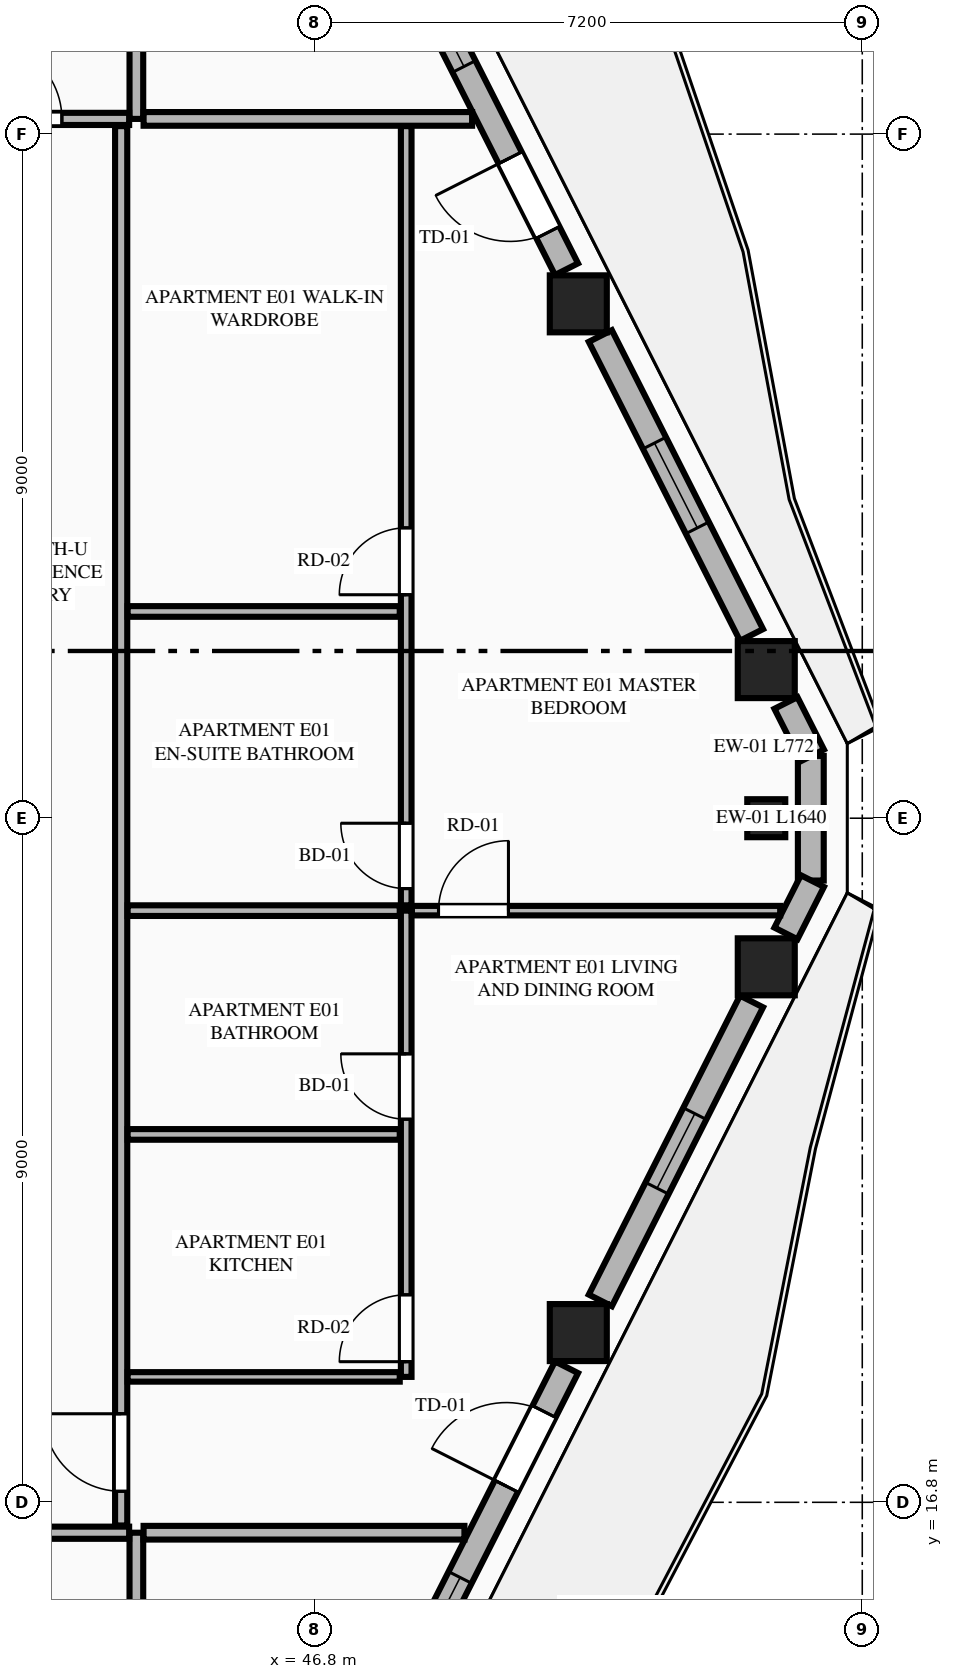
"""IFC4 building model, lengths in metres.
Left out: names, types, materials, properties, quantities, classifications, styles, units other than length and angle.
Written with IfcOpenShell. Run it as: python <this file> out.ifc"""

import sys

from ifc_helpers import new_model, si_unit, direction, frame, frame_2d, origin, origin_2d, place, context, subcontext, project, spatial, rectangle, extrude, element, fill, save


model = new_model("IFC4")
c1 = context("Model", 3, precision=1e-05, world=origin(), true_north=direction((0.0, 1.0)))
c2 = subcontext(c1, "Body", "Model", "MODEL_VIEW")
j1 = project(units=[si_unit("LENGTHUNIT", "METRE"), si_unit("PLANEANGLEUNIT", "RADIAN")], contexts=[c1])
p1 = place(None, origin())
s1 = spatial("IfcSite", under=j1, at=p1, CompositionType="ELEMENT")
p2 = place(p1, origin())
s2 = spatial("IfcBuilding", under=s1, at=p2, CompositionType="ELEMENT")
p3 = place(p2, frame((0.0, 0.0, 237.95)))
s3 = spatial("IfcBuildingStorey", under=s2, at=p3, CompositionType="ELEMENT", Elevation=237.95)
for number, where, z_axis, x_axis in (
    (1, (50.264, 19.033, 0.0), (0.0, 0.0, 1.0), (1.0, 0.0, 0.0)),
    (2, (52.737, 23.845, 0.0), (0.0, 0.0, 1.0), (1.0, 0.0, 0.0)),
    (3, (52.737, 27.755, 0.0), (0.0, 0.0, 1.0), (1.0, 0.0, 0.0)),
    (4, (50.264, 32.567, 0.0), (0.0, 0.0, 1.0), (1.0, 0.0, 0.0)),
):
    element("IfcColumn", number, at=place(p3, frame(where, z_axis=z_axis, x_axis=x_axis)), inside=s3, PredefinedType="COLUMN", context=c2, shape_type="SweptSolid", body=[
        extrude(rectangle(XDim=0.75, YDim=0.75, at=origin_2d()), origin(), (0.0, 0.0, 1.0), 3.65),
    ])
p4 = place(p3, frame((52.737, 25.8, 0.0), z_axis=(0.0, 0.0, 1.0), x_axis=(0.0, 1.0, 0.0)))
e5 = element("IfcColumn", 5, at=p4, inside=s3, PredefinedType="PILASTER", context=c2, shape_type="SweptSolid", body=[
    extrude(rectangle(XDim=0.5, YDim=0.35, at=origin_2d()), origin(), (0.0, 0.0, 1.0), 3.65),
])
p5 = place(p3, frame((53.323, 24.98, 0.0), z_axis=(0.0, 0.0, 1.0), x_axis=(0.0, 1.0, 0.0)))
e6 = element("IfcWall", 6, at=p5, inside=s3, PredefinedType="STANDARD", context=c2, shape_type="SweptSolid", body=[
    extrude(rectangle(XDim=1.64, YDim=0.34, at=frame_2d((0.82, 0.0))), origin(), (0.0, 0.0, 1.0), 3.45),
])
p6 = place(p3, frame((48.032, 14.473, 0.0), z_axis=(0.0, 0.0, 1.0), x_axis=(0.451539564999, 0.892251097641, 0.0)))
e7 = element("IfcWall", 7, at=p6, inside=s3, PredefinedType="STANDARD", context=c2, shape_type="SweptSolid", body=[
    extrude(rectangle(XDim=4.6, YDim=0.34, at=frame_2d((2.3, 0.0))), origin(), (0.0, 0.0, 1.0), 2.983),
])
p7 = place(p6, frame((2.846, 0.0, 0.0)))
e8 = element("IfcOpeningElement", 8, at=p7, cuts=e7, PredefinedType="OPENING", context=c2, shape_type="SweptSolid", body=[
    extrude(rectangle(XDim=1.1, YDim=2.25, at=frame_2d((0.55, 1.125))), frame((0.0, 0.18, 0.0), z_axis=(0.0, -1.0, 0.0), x_axis=(1.0, 0.0, 0.0)), (0.0, 0.0, 1.0), 0.36),
])
p8 = place(p6, frame((0.4, 0.0, 0.75)))
e9 = element("IfcOpeningElement", 9, at=p8, cuts=e7, PredefinedType="OPENING", context=c2, shape_type="SweptSolid", body=[
    extrude(rectangle(XDim=1.1, YDim=2.0, at=frame_2d((0.55, 1.0))), frame((0.0, 0.18, 0.0), z_axis=(0.0, -1.0, 0.0), x_axis=(1.0, 0.0, 0.0)), (0.0, 0.0, 1.0), 0.36),
])
p9 = place(p3, frame((50.554, 19.456, 0.0), z_axis=(0.0, 0.0, 1.0), x_axis=(0.45130817501, 0.892368158984, 0.0)))
e10 = element("IfcWall", 10, at=p9, inside=s3, PredefinedType="STANDARD", context=c2, shape_type="SweptSolid", body=[
    extrude(rectangle(XDim=4.407, YDim=0.34, at=frame_2d((2.204, 0.0))), origin(), (0.0, 0.0, 1.0), 2.983),
])
p10 = place(p9, frame((1.654, 0.0, 0.75)))
e11 = element("IfcOpeningElement", 11, at=p10, cuts=e10, PredefinedType="OPENING", context=c2, shape_type="SweptSolid", body=[
    extrude(rectangle(XDim=1.1, YDim=2.0, at=frame_2d((0.55, 1.0))), frame((0.0, 0.18, 0.0), z_axis=(0.0, -1.0, 0.0), x_axis=(1.0, 0.0, 0.0)), (0.0, 0.0, 1.0), 0.36),
])
for number, where, z_axis, x_axis in (
    (12, (52.996, 24.284, 0.0), (0.0, 0.0, 1.0), (0.451, 0.893, 0.0)),
    (13, (53.344, 26.627, 0.0), (0.0, 0.0, 1.0), (-0.451, 0.893, 0.0)),
):
    element("IfcWall", number, at=place(p3, frame(where, z_axis=z_axis, x_axis=x_axis)), inside=s3, PredefinedType="STANDARD", context=c2, shape_type="SweptSolid", body=[
        extrude(rectangle(XDim=0.772, YDim=0.34, at=frame_2d((0.386, 0.0))), origin(), (0.0, 0.0, 1.0), 3.45),
    ])
p11 = place(p3, frame((52.543, 28.211, 0.0), z_axis=(0.0, 0.0, 1.0), x_axis=(-0.451285866323, 0.892379441077, 0.0)))
e14 = element("IfcWall", 14, at=p11, inside=s3, PredefinedType="STANDARD", context=c2, shape_type="SweptSolid", body=[
    extrude(rectangle(XDim=4.407, YDim=0.34, at=frame_2d((2.204, 0.0))), origin(), (0.0, 0.0, 1.0), 2.983),
])
p12 = place(p11, frame((1.579, 0.0, 0.75)))
e15 = element("IfcOpeningElement", 15, at=p12, cuts=e14, PredefinedType="OPENING", context=c2, shape_type="SweptSolid", body=[
    extrude(rectangle(XDim=1.25, YDim=1.95, at=frame_2d((0.625, 0.975))), frame((0.0, 0.18, 0.0), z_axis=(0.0, -1.0, 0.0), x_axis=(1.0, 0.0, 0.0)), (0.0, 0.0, 1.0), 0.36),
])
p13 = place(p3, frame((50.109, 33.023, 0.0), z_axis=(0.0, 0.0, 1.0), x_axis=(-0.451539564999, 0.892251097641, 0.0)))
e16 = element("IfcWall", 16, at=p13, inside=s3, PredefinedType="STANDARD", context=c2, shape_type="SweptSolid", body=[
    extrude(rectangle(XDim=4.6, YDim=0.34, at=frame_2d((2.3, 0.0))), origin(), (0.0, 0.0, 1.0), 2.983),
])
p14 = place(p13, frame((0.542, 0.0, 0.0)))
e17 = element("IfcOpeningElement", 17, at=p14, cuts=e16, PredefinedType="OPENING", context=c2, shape_type="SweptSolid", body=[
    extrude(rectangle(XDim=1.1, YDim=2.25, at=frame_2d((0.55, 1.125))), frame((0.0, 0.18, 0.0), z_axis=(0.0, -1.0, 0.0), x_axis=(1.0, 0.0, 0.0)), (0.0, 0.0, 1.0), 0.36),
])
p15 = place(p13, frame((2.988, 0.0, 0.75)))
e18 = element("IfcOpeningElement", 18, at=p15, cuts=e16, PredefinedType="OPENING", context=c2, shape_type="SweptSolid", body=[
    extrude(rectangle(XDim=1.1, YDim=2.0, at=frame_2d((0.55, 1.0))), frame((0.0, 0.18, 0.0), z_axis=(0.0, -1.0, 0.0), x_axis=(1.0, 0.0, 0.0)), (0.0, 0.0, 1.0), 0.36),
])
p16 = place(p3, frame((44.45, 8.119, 0.0), z_axis=(0.0, 0.0, 1.0), x_axis=(0.0, 1.0, 0.0)))
e19 = element("IfcWall", 19, at=p16, inside=s3, PredefinedType="PARTITIONING", context=c2, shape_type="SweptSolid", body=[
    extrude(rectangle(XDim=8.281, YDim=0.18, at=frame_2d((4.141, 0.0))), origin(), (0.0, 0.0, 1.0), 3.45),
])
p17 = place(p3, frame((29.241, 16.4, 0.0), z_axis=(0.0, 0.0, 1.0), x_axis=(1.0, 0.0, 0.0)))
e20 = element("IfcWall", 20, at=p17, inside=s3, PredefinedType="PARTITIONING", context=c2, shape_type="SweptSolid", body=[
    extrude(rectangle(XDim=15.114, YDim=0.16, at=frame_2d((7.557, 0.0))), origin(), (0.0, 0.0, 1.0), 3.45),
])
p18 = place(p17, frame((12.909, 0.0, 0.0)))
e21 = element("IfcOpeningElement", 21, at=p18, cuts=e20, PredefinedType="OPENING", context=c2, shape_type="SweptSolid", body=[
    extrude(rectangle(XDim=1.02, YDim=2.25, at=frame_2d((0.51, 1.125))), frame((0.0, 0.09, 0.0), z_axis=(0.0, -1.0, 0.0), x_axis=(1.0, 0.0, 0.0)), (0.0, 0.0, 1.0), 0.18),
])
p19 = place(p3, frame((44.45, 35.0, 0.0), z_axis=(0.0, 0.0, 1.0), x_axis=(0.0, 1.0, 0.0)))
e22 = element("IfcWall", 22, at=p19, inside=s3, PredefinedType="PARTITIONING", context=c2, shape_type="SweptSolid", body=[
    extrude(rectangle(XDim=8.481, YDim=0.18, at=frame_2d((4.24, 0.0))), origin(), (0.0, 0.0, 1.0), 3.45),
])
p20 = place(p3, frame((29.241, 35.0, 0.0), z_axis=(0.0, 0.0, 1.0), x_axis=(1.0, 0.0, 0.0)))
e23 = element("IfcWall", 23, at=p20, inside=s3, PredefinedType="PARTITIONING", context=c2, shape_type="SweptSolid", body=[
    extrude(rectangle(XDim=15.114, YDim=0.16, at=frame_2d((7.557, 0.0))), origin(), (0.0, 0.0, 1.0), 3.45),
])
p21 = place(p20, frame((13.209, 0.0, 0.0)))
e24 = element("IfcOpeningElement", 24, at=p21, cuts=e23, PredefinedType="OPENING", context=c2, shape_type="SweptSolid", body=[
    extrude(rectangle(XDim=1.02, YDim=2.25, at=frame_2d((0.51, 1.125))), frame((0.0, 0.09, 0.0), z_axis=(0.0, -1.0, 0.0), x_axis=(1.0, 0.0, 0.0)), (0.0, 0.0, 1.0), 0.18),
])
p22 = place(p3, frame((44.545, 16.4, 0.0), z_axis=(0.0, 0.0, 1.0), x_axis=(1.0, 0.0, 0.0)))
e25 = element("IfcWall", 25, at=p22, inside=s3, PredefinedType="PARTITIONING", context=c2, shape_type="SweptSolid", body=[
    extrude(rectangle(XDim=4.221, YDim=0.18, at=frame_2d((2.111, 0.0))), origin(), (0.0, 0.0, 1.0), 3.45),
])
p23 = place(p3, frame((44.545, 35.0, 0.0), z_axis=(0.0, 0.0, 1.0), x_axis=(1.0, 0.0, 0.0)))
e26 = element("IfcWall", 26, at=p23, inside=s3, PredefinedType="PARTITIONING", context=c2, shape_type="SweptSolid", body=[
    extrude(rectangle(XDim=4.322, YDim=0.18, at=frame_2d((2.161, 0.0))), origin(), (0.0, 0.0, 1.0), 3.45),
])
p24 = place(p3, frame((44.25, 16.495, 0.0), z_axis=(0.0, 0.0, 1.0), x_axis=(0.0, 1.0, 0.0)))
e27 = element("IfcWall", 27, at=p24, inside=s3, PredefinedType="PARTITIONING", context=c2, shape_type="SweptSolid", body=[
    extrude(rectangle(XDim=18.41, YDim=0.16, at=frame_2d((9.205, 0.0))), origin(), (0.0, 0.0, 1.0), 3.137),
])
p25 = place(p24, frame((0.45, 0.0, 0.0)))
e28 = element("IfcOpeningElement", 28, at=p25, cuts=e27, PredefinedType="OPENING", context=c2, shape_type="SweptSolid", body=[
    extrude(rectangle(XDim=1.02, YDim=2.25, at=frame_2d((0.51, 1.125))), frame((0.0, 0.09, 0.0), z_axis=(0.0, -1.0, 0.0), x_axis=(1.0, 0.0, 0.0)), (0.0, 0.0, 1.0), 0.18),
])
p26 = place(p3, frame((44.335, 18.45, 0.0), z_axis=(0.0, 0.0, 1.0), x_axis=(1.0, 0.0, 0.0)))
e29 = element("IfcWall", 29, at=p26, inside=s3, PredefinedType="PARTITIONING", context=c2, shape_type="SweptSolid", body=[
    extrude(rectangle(XDim=3.58, YDim=0.125, at=frame_2d((1.79, 0.0))), origin(), (0.0, 0.0, 1.0), 3.45),
])
p27 = place(p3, frame((48.0, 18.45, 0.0), z_axis=(0.0, 0.0, 1.0), x_axis=(0.0, 1.0, 0.0)))
e30 = element("IfcWall", 30, at=p27, inside=s3, PredefinedType="PLUMBINGWALL", context=c2, shape_type="SweptSolid", body=[
    extrude(rectangle(XDim=6.134, YDim=0.14, at=frame_2d((3.067, 0.0))), origin(), (0.0, 0.0, 1.0), 3.45),
])
p28 = place(p27, frame((0.2, 0.0, 0.0)))
e31 = element("IfcOpeningElement", 31, at=p28, cuts=e30, PredefinedType="OPENING", context=c2, shape_type="SweptSolid", body=[
    extrude(rectangle(XDim=0.88, YDim=2.15, at=frame_2d((0.44, 1.075))), frame((0.0, 0.08, 0.0), z_axis=(0.0, -1.0, 0.0), x_axis=(1.0, 0.0, 0.0)), (0.0, 0.0, 1.0), 0.16),
])
p29 = place(p27, frame((3.39, 0.0, 0.0)))
e32 = element("IfcOpeningElement", 32, at=p29, cuts=e30, PredefinedType="OPENING", context=c2, shape_type="SweptSolid", body=[
    extrude(rectangle(XDim=0.86, YDim=2.1, at=frame_2d((0.43, 1.05))), frame((0.0, 0.08, 0.0), z_axis=(0.0, -1.0, 0.0), x_axis=(1.0, 0.0, 0.0)), (0.0, 0.0, 1.0), 0.16),
])
p30 = place(p3, frame((48.0, 24.654, 0.0), z_axis=(0.0, 0.0, 1.0), x_axis=(0.0, 1.0, 0.0)))
e33 = element("IfcWall", 33, at=p30, inside=s3, PredefinedType="PLUMBINGWALL", context=c2, shape_type="SweptSolid", body=[
    extrude(rectangle(XDim=10.251, YDim=0.14, at=frame_2d((5.125, 0.0))), origin(), (0.0, 0.0, 1.0), 3.45),
])
p31 = place(p30, frame((0.22, 0.0, 0.0)))
e34 = element("IfcOpeningElement", 34, at=p31, cuts=e33, PredefinedType="OPENING", context=c2, shape_type="SweptSolid", body=[
    extrude(rectangle(XDim=0.86, YDim=2.1, at=frame_2d((0.43, 1.05))), frame((0.0, 0.08, 0.0), z_axis=(0.0, -1.0, 0.0), x_axis=(1.0, 0.0, 0.0)), (0.0, 0.0, 1.0), 0.16),
])
p32 = place(p30, frame((4.086, 0.0, 0.0)))
e35 = element("IfcOpeningElement", 35, at=p32, cuts=e33, PredefinedType="OPENING", context=c2, shape_type="SweptSolid", body=[
    extrude(rectangle(XDim=0.88, YDim=2.15, at=frame_2d((0.44, 1.075))), frame((0.0, 0.08, 0.0), z_axis=(0.0, -1.0, 0.0), x_axis=(1.0, 0.0, 0.0)), (0.0, 0.0, 1.0), 0.16),
])
p33 = place(p3, frame((44.335, 24.584, 0.0), z_axis=(0.0, 0.0, 1.0), x_axis=(1.0, 0.0, 0.0)))
e36 = element("IfcWall", 36, at=p33, inside=s3, PredefinedType="PLUMBINGWALL", context=c2, shape_type="SweptSolid", body=[
    extrude(rectangle(XDim=3.58, YDim=0.14, at=frame_2d((1.79, 0.0))), origin(), (0.0, 0.0, 1.0), 3.45),
])
p34 = place(p3, frame((48.075, 24.584, 0.0), z_axis=(0.0, 0.0, 1.0), x_axis=(1.0, 0.0, 0.0)))
e37 = element("IfcWall", 37, at=p34, inside=s3, PredefinedType="PARTITIONING", context=c2, shape_type="SweptSolid", body=[
    extrude(rectangle(XDim=4.845, YDim=0.125, at=frame_2d((2.422, 0.0))), origin(), (0.0, 0.0, 1.0), 3.45),
])
p35 = place(p34, frame((0.35, 0.0, 0.0)))
e38 = element("IfcOpeningElement", 38, at=p35, cuts=e37, PredefinedType="OPENING", context=c2, shape_type="SweptSolid", body=[
    extrude(rectangle(XDim=0.92, YDim=2.15, at=frame_2d((0.46, 1.075))), frame((0.0, 0.073, 0.0), z_axis=(0.0, -1.0, 0.0), x_axis=(1.0, 0.0, 0.0)), (0.0, 0.0, 1.0), 0.145),
])
for number, where, z_axis, x_axis in (
    (39, (44.335, 21.64, 0.0), (0.0, 0.0, 1.0), (1.0, 0.0, 0.0)),
    (40, (44.335, 28.52, 0.0), (0.0, 0.0, 1.0), (1.0, 0.0, 0.0)),
):
    element("IfcWall", number, at=place(p3, frame(where, z_axis=z_axis, x_axis=x_axis)), inside=s3, PredefinedType="PLUMBINGWALL", context=c2, shape_type="SweptSolid", body=[
        extrude(rectangle(XDim=3.58, YDim=0.14, at=frame_2d((1.79, 0.0))), origin(), (0.0, 0.0, 1.0), 3.45),
    ])
p36 = place(p7, origin())
e41 = element("IfcDoor", 41, at=p36, inside=s3, OperationType="SINGLE_SWING_LEFT", PredefinedType="DOOR", context=c2, shape_type="SweptSolid", body=[
    extrude(rectangle(XDim=1.1, YDim=2.25, at=frame_2d((0.55, 1.125))), frame((0.0, 0.025, 0.0), z_axis=(0.0, -1.0, 0.0), x_axis=(1.0, 0.0, 0.0)), (0.0, 0.0, 1.0), 0.05),
])
fill(e8, e41)
p37 = place(p10, origin())
e42 = element("IfcWindow", 42, at=p37, inside=s3, PartitioningType="SINGLE_PANEL", PredefinedType="WINDOW", context=c2, shape_type="SweptSolid", body=[
    extrude(rectangle(XDim=1.1, YDim=2.0, at=frame_2d((0.55, 1.0))), frame((0.0, 0.03, 0.0), z_axis=(0.0, -1.0, 0.0), x_axis=(1.0, 0.0, 0.0)), (0.0, 0.0, 1.0), 0.06),
])
fill(e11, e42)
p38 = place(p12, origin())
e43 = element("IfcWindow", 43, at=p38, inside=s3, PartitioningType="SINGLE_PANEL", PredefinedType="WINDOW", context=c2, shape_type="SweptSolid", body=[
    extrude(rectangle(XDim=1.25, YDim=1.95, at=frame_2d((0.625, 0.975))), frame((0.0, 0.03, 0.0), z_axis=(0.0, -1.0, 0.0), x_axis=(1.0, 0.0, 0.0)), (0.0, 0.0, 1.0), 0.06),
])
fill(e15, e43)
p39 = place(p14, origin())
e44 = element("IfcDoor", 44, at=p39, inside=s3, OperationType="SINGLE_SWING_RIGHT", PredefinedType="DOOR", context=c2, shape_type="SweptSolid", body=[
    extrude(rectangle(XDim=1.1, YDim=2.25, at=frame_2d((0.55, 1.125))), frame((0.0, 0.025, 0.0), z_axis=(0.0, -1.0, 0.0), x_axis=(1.0, 0.0, 0.0)), (0.0, 0.0, 1.0), 0.05),
])
fill(e17, e44)
p40 = place(p21, origin())
e45 = element("IfcDoor", 45, at=p40, inside=s3, OperationType="SINGLE_SWING_LEFT", PredefinedType="DOOR", context=c2, shape_type="SweptSolid", body=[
    extrude(rectangle(XDim=1.02, YDim=2.25, at=frame_2d((0.51, 1.125))), frame((0.0, 0.025, 0.0), z_axis=(0.0, -1.0, 0.0), x_axis=(1.0, 0.0, 0.0)), (0.0, 0.0, 1.0), 0.05),
])
fill(e24, e45)
p41 = place(p28, origin())
e46 = element("IfcDoor", 46, at=p41, inside=s3, OperationType="SINGLE_SWING_LEFT", PredefinedType="DOOR", context=c2, shape_type="SweptSolid", body=[
    extrude(rectangle(XDim=0.88, YDim=2.15, at=frame_2d((0.44, 1.075))), frame((0.0, 0.025, 0.0), z_axis=(0.0, -1.0, 0.0), x_axis=(1.0, 0.0, 0.0)), (0.0, 0.0, 1.0), 0.05),
])
fill(e31, e46)
p42 = place(p29, origin())
e47 = element("IfcDoor", 47, at=p42, inside=s3, OperationType="SINGLE_SWING_RIGHT", PredefinedType="DOOR", context=c2, shape_type="SweptSolid", body=[
    extrude(rectangle(XDim=0.86, YDim=2.1, at=frame_2d((0.43, 1.05))), frame((0.0, 0.025, 0.0), z_axis=(0.0, -1.0, 0.0), x_axis=(1.0, 0.0, 0.0)), (0.0, 0.0, 1.0), 0.05),
])
fill(e32, e47)
p43 = place(p31, origin())
e48 = element("IfcDoor", 48, at=p43, inside=s3, OperationType="SINGLE_SWING_RIGHT", PredefinedType="DOOR", context=c2, shape_type="SweptSolid", body=[
    extrude(rectangle(XDim=0.86, YDim=2.1, at=frame_2d((0.43, 1.05))), frame((0.0, 0.025, 0.0), z_axis=(0.0, -1.0, 0.0), x_axis=(1.0, 0.0, 0.0)), (0.0, 0.0, 1.0), 0.05),
])
fill(e34, e48)
p44 = place(p32, origin())
e49 = element("IfcDoor", 49, at=p44, inside=s3, OperationType="SINGLE_SWING_LEFT", PredefinedType="DOOR", context=c2, shape_type="SweptSolid", body=[
    extrude(rectangle(XDim=0.88, YDim=2.15, at=frame_2d((0.44, 1.075))), frame((0.0, 0.025, 0.0), z_axis=(0.0, -1.0, 0.0), x_axis=(1.0, 0.0, 0.0)), (0.0, 0.0, 1.0), 0.05),
])
fill(e35, e49)
p45 = place(p25, origin())
e50 = element("IfcDoor", 50, at=p45, inside=s3, OperationType="SINGLE_SWING_RIGHT", PredefinedType="DOOR", context=c2, shape_type="SweptSolid", body=[
    extrude(rectangle(XDim=1.02, YDim=2.25, at=frame_2d((0.51, 1.125))), frame((0.0, 0.025, 0.0), z_axis=(0.0, -1.0, 0.0), x_axis=(1.0, 0.0, 0.0)), (0.0, 0.0, 1.0), 0.05),
])
fill(e28, e50)
p46 = place(p35, origin())
e51 = element("IfcDoor", 51, at=p46, inside=s3, OperationType="SINGLE_SWING_RIGHT", PredefinedType="DOOR", context=c2, shape_type="SweptSolid", body=[
    extrude(rectangle(XDim=0.92, YDim=2.15, at=frame_2d((0.46, 1.075))), frame((0.0, 0.025, 0.0), z_axis=(0.0, -1.0, 0.0), x_axis=(1.0, 0.0, 0.0)), (0.0, 0.0, 1.0), 0.05),
])
fill(e38, e51)
p47 = place(p8, origin())
e52 = element("IfcWindow", 52, at=p47, inside=s3, PartitioningType="SINGLE_PANEL", PredefinedType="WINDOW", context=c2, shape_type="SweptSolid", body=[
    extrude(rectangle(XDim=1.1, YDim=2.0, at=frame_2d((0.55, 1.0))), frame((0.0, 0.03, 0.0), z_axis=(0.0, -1.0, 0.0), x_axis=(1.0, 0.0, 0.0)), (0.0, 0.0, 1.0), 0.06),
])
fill(e9, e52)
p48 = place(p15, origin())
e53 = element("IfcWindow", 53, at=p48, inside=s3, PartitioningType="SINGLE_PANEL", PredefinedType="WINDOW", context=c2, shape_type="SweptSolid", body=[
    extrude(rectangle(XDim=1.1, YDim=2.0, at=frame_2d((0.55, 1.0))), frame((0.0, 0.03, 0.0), z_axis=(0.0, -1.0, 0.0), x_axis=(1.0, 0.0, 0.0)), (0.0, 0.0, 1.0), 0.06),
])
fill(e18, e53)
save(model, sys.argv[1])
